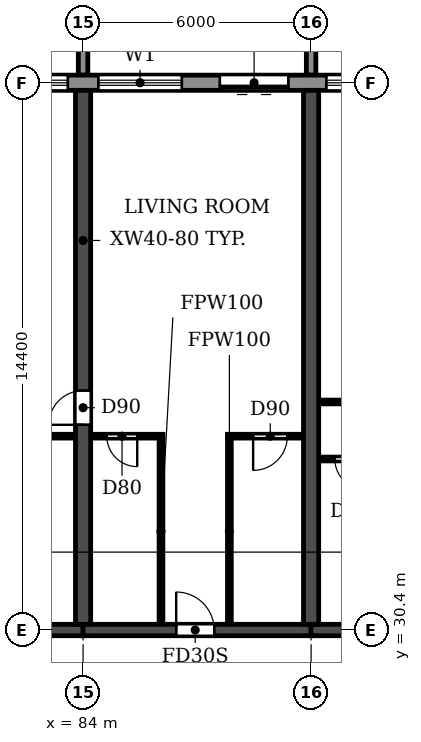
"""IFC4 building model, lengths in metres.
Left out: names, types, materials, properties, quantities, classifications, styles, units other than length and angle.
Written with IfcOpenShell. Run it as: python <this file> out.ifc"""

import sys

from ifc_helpers import new_model, si_unit, direction, frame, frame_2d, origin, place, context, subcontext, project, spatial, polyline, rectangle, outline, extrude, source, transform, mapped, element, fill, save


model = new_model("IFC4")
c1 = context("Model", 3, precision=1e-05, world=origin(), true_north=direction((0.0, 1.0)))
c2 = subcontext(c1, "Body", "Model", "MODEL_VIEW")
j1 = project(units=[si_unit("LENGTHUNIT", "METRE"), si_unit("PLANEANGLEUNIT", "RADIAN")], contexts=[c1])
p1 = place(None, origin())
s1 = spatial("IfcSite", under=j1, at=p1, CompositionType="ELEMENT")
p2 = place(p1, origin())
s2 = spatial("IfcBuilding", under=s1, at=p2, CompositionType="ELEMENT")
p3 = place(p2, frame((0.0, 0.0, 49.8)))
s3 = spatial("IfcBuildingStorey", under=s2, at=p3, CompositionType="ELEMENT", Elevation=49.8)
p4 = place(p3, frame((84.0, 30.55, 0.0), z_axis=(0.0, 0.0, 1.0), x_axis=(0.0, 1.0, 0.0)))
e1 = element("IfcWall", 1, at=p4, inside=s3, PredefinedType="SHEAR", context=c2, shape_type="SweptSolid", body=[
    extrude(rectangle(XDim=14.05, YDim=0.4, at=frame_2d((7.025, 0.0))), origin(), (0.0, 0.0, 1.0), 3.0),
])
p5 = place(p4, frame((5.25, 0.0, 0.0)))
e2 = element("IfcOpeningElement", 2, at=p5, cuts=e1, PredefinedType="OPENING", context=c2, shape_type="SweptSolid", body=[
    extrude(rectangle(XDim=0.9, YDim=2.1, at=frame_2d((0.45, 1.05))), frame((0.0, 0.21, 0.0), z_axis=(0.0, -1.0, 0.0), x_axis=(1.0, 0.0, 0.0)), (0.0, 0.0, 1.0), 0.42),
])
p6 = place(p3, frame((90.0, 30.55, 0.0), z_axis=(0.0, 0.0, 1.0), x_axis=(0.0, 1.0, 0.0)))
e3 = element("IfcWall", 3, at=p6, inside=s3, PredefinedType="SHEAR", context=c2, shape_type="SweptSolid", body=[
    extrude(rectangle(XDim=14.05, YDim=0.4, at=frame_2d((7.025, 0.0))), origin(), (0.0, 0.0, 1.0), 3.0),
])
p7 = place(p3, frame((78.0, 30.4, 0.0), z_axis=(0.0, 0.0, 1.0), x_axis=(1.0, 0.0, 0.0)))
e4 = element("IfcWall", 4, at=p7, inside=s3, PredefinedType="SHEAR", context=c2, shape_type="SweptSolid", body=[
    extrude(rectangle(XDim=6.0, YDim=0.3, at=frame_2d((3.0, 0.0))), origin(), (0.0, 0.0, 1.0), 2.4),
])
p8 = place(p3, frame((84.0, 30.4, 0.0), z_axis=(0.0, 0.0, 1.0), x_axis=(1.0, 0.0, 0.0)))
e5 = element("IfcWall", 5, at=p8, inside=s3, PredefinedType="SHEAR", context=c2, shape_type="SweptSolid", body=[
    extrude(rectangle(XDim=6.0, YDim=0.3, at=frame_2d((3.0, 0.0))), origin(), (0.0, 0.0, 1.0), 2.4),
])
p9 = place(p8, frame((2.45, 0.0, 0.0)))
e6 = element("IfcOpeningElement", 6, at=p9, cuts=e5, PredefinedType="OPENING", context=c2, shape_type="SweptSolid", body=[
    extrude(rectangle(XDim=1.0, YDim=2.1, at=frame_2d((0.5, 1.05))), frame((0.0, 0.16, 0.0), z_axis=(0.0, -1.0, 0.0), x_axis=(1.0, 0.0, 0.0)), (0.0, 0.0, 1.0), 0.32),
])
p10 = place(p3, frame((90.0, 30.4, 0.0), z_axis=(0.0, 0.0, 1.0), x_axis=(1.0, 0.0, 0.0)))
e7 = element("IfcWall", 7, at=p10, inside=s3, PredefinedType="SHEAR", context=c2, shape_type="SweptSolid", body=[
    extrude(rectangle(XDim=6.0, YDim=0.3, at=frame_2d((3.0, 0.0))), origin(), (0.0, 0.0, 1.0), 2.4),
])
p11 = place(p10, frame((2.45, 0.0, 0.0)))
e8 = element("IfcOpeningElement", 8, at=p11, cuts=e7, PredefinedType="OPENING", context=c2, shape_type="SweptSolid", body=[
    extrude(rectangle(XDim=1.0, YDim=2.1, at=frame_2d((0.5, 1.05))), frame((0.0, 0.16, 0.0), z_axis=(0.0, -1.0, 0.0), x_axis=(1.0, 0.0, 0.0)), (0.0, 0.0, 1.0), 0.32),
])
p12 = place(p3, frame((97.317, 44.8, 0.0), z_axis=(0.0, 0.0, 1.0), x_axis=(-1.0, 0.0, 0.0)))
e9 = element("IfcWall", 9, at=p12, inside=s3, PredefinedType="STANDARD", context=c2, shape_type="SweptSolid", body=[
    extrude(rectangle(XDim=92.634, YDim=0.4, at=frame_2d((46.317, 0.0))), origin(), (0.0, 0.0, 1.0), 3.0),
])
p13 = place(p12, frame((88.917, 0.0, 0.0)))
e10 = element("IfcOpeningElement", 10, at=p13, cuts=e9, PredefinedType="OPENING", context=c2, shape_type="SweptSolid", body=[
    extrude(rectangle(XDim=1.8, YDim=2.4, at=frame_2d((0.9, 1.2))), frame((0.0, 0.21, 0.0), z_axis=(0.0, -1.0, 0.0), x_axis=(1.0, 0.0, 0.0)), (0.0, 0.0, 1.0), 0.42),
])
p14 = place(p12, frame((85.717, 0.0, 0.9)))
e11 = element("IfcOpeningElement", 11, at=p14, cuts=e9, PredefinedType="OPENING", context=c2, shape_type="SweptSolid", body=[
    extrude(rectangle(XDim=2.2, YDim=1.5, at=frame_2d((1.1, 0.75))), frame((0.0, 0.21, 0.0), z_axis=(0.0, -1.0, 0.0), x_axis=(1.0, 0.0, 0.0)), (0.0, 0.0, 1.0), 0.42),
])
p15 = place(p12, frame((82.717, 0.0, 0.9)))
e12 = element("IfcOpeningElement", 12, at=p15, cuts=e9, PredefinedType="OPENING", context=c2, shape_type="SweptSolid", body=[
    extrude(rectangle(XDim=2.2, YDim=1.5, at=frame_2d((1.1, 0.75))), frame((0.0, 0.21, 0.0), z_axis=(0.0, -1.0, 0.0), x_axis=(1.0, 0.0, 0.0)), (0.0, 0.0, 1.0), 0.42),
])
p16 = place(p12, frame((79.717, 0.0, 0.9)))
e13 = element("IfcOpeningElement", 13, at=p16, cuts=e9, PredefinedType="OPENING", context=c2, shape_type="SweptSolid", body=[
    extrude(rectangle(XDim=2.2, YDim=1.5, at=frame_2d((1.1, 0.75))), frame((0.0, 0.21, 0.0), z_axis=(0.0, -1.0, 0.0), x_axis=(1.0, 0.0, 0.0)), (0.0, 0.0, 1.0), 0.42),
])
p17 = place(p12, frame((76.717, 0.0, 0.9)))
e14 = element("IfcOpeningElement", 14, at=p17, cuts=e9, PredefinedType="OPENING", context=c2, shape_type="SweptSolid", body=[
    extrude(rectangle(XDim=2.2, YDim=1.5, at=frame_2d((1.1, 0.75))), frame((0.0, 0.21, 0.0), z_axis=(0.0, -1.0, 0.0), x_axis=(1.0, 0.0, 0.0)), (0.0, 0.0, 1.0), 0.42),
])
p18 = place(p12, frame((73.917, 0.0, 0.0)))
e15 = element("IfcOpeningElement", 15, at=p18, cuts=e9, PredefinedType="OPENING", context=c2, shape_type="SweptSolid", body=[
    extrude(rectangle(XDim=1.8, YDim=2.4, at=frame_2d((0.9, 1.2))), frame((0.0, 0.21, 0.0), z_axis=(0.0, -1.0, 0.0), x_axis=(1.0, 0.0, 0.0)), (0.0, 0.0, 1.0), 0.42),
])
p19 = place(p12, frame((70.717, 0.0, 0.9)))
e16 = element("IfcOpeningElement", 16, at=p19, cuts=e9, PredefinedType="OPENING", context=c2, shape_type="SweptSolid", body=[
    extrude(rectangle(XDim=2.2, YDim=1.5, at=frame_2d((1.1, 0.75))), frame((0.0, 0.21, 0.0), z_axis=(0.0, -1.0, 0.0), x_axis=(1.0, 0.0, 0.0)), (0.0, 0.0, 1.0), 0.42),
])
p20 = place(p12, frame((67.717, 0.0, 0.9)))
e17 = element("IfcOpeningElement", 17, at=p20, cuts=e9, PredefinedType="OPENING", context=c2, shape_type="SweptSolid", body=[
    extrude(rectangle(XDim=2.2, YDim=1.5, at=frame_2d((1.1, 0.75))), frame((0.0, 0.21, 0.0), z_axis=(0.0, -1.0, 0.0), x_axis=(1.0, 0.0, 0.0)), (0.0, 0.0, 1.0), 0.42),
])
p21 = place(p12, frame((64.717, 0.0, 0.9)))
e18 = element("IfcOpeningElement", 18, at=p21, cuts=e9, PredefinedType="OPENING", context=c2, shape_type="SweptSolid", body=[
    extrude(rectangle(XDim=2.2, YDim=1.5, at=frame_2d((1.1, 0.75))), frame((0.0, 0.21, 0.0), z_axis=(0.0, -1.0, 0.0), x_axis=(1.0, 0.0, 0.0)), (0.0, 0.0, 1.0), 0.42),
])
p22 = place(p12, frame((61.917, 0.0, 0.0)))
e19 = element("IfcOpeningElement", 19, at=p22, cuts=e9, PredefinedType="OPENING", context=c2, shape_type="SweptSolid", body=[
    extrude(rectangle(XDim=1.8, YDim=2.4, at=frame_2d((0.9, 1.2))), frame((0.0, 0.21, 0.0), z_axis=(0.0, -1.0, 0.0), x_axis=(1.0, 0.0, 0.0)), (0.0, 0.0, 1.0), 0.42),
])
p23 = place(p12, frame((58.717, 0.0, 0.9)))
e20 = element("IfcOpeningElement", 20, at=p23, cuts=e9, PredefinedType="OPENING", context=c2, shape_type="SweptSolid", body=[
    extrude(rectangle(XDim=2.2, YDim=1.5, at=frame_2d((1.1, 0.75))), frame((0.0, 0.21, 0.0), z_axis=(0.0, -1.0, 0.0), x_axis=(1.0, 0.0, 0.0)), (0.0, 0.0, 1.0), 0.42),
])
p24 = place(p12, frame((55.717, 0.0, 0.9)))
e21 = element("IfcOpeningElement", 21, at=p24, cuts=e9, PredefinedType="OPENING", context=c2, shape_type="SweptSolid", body=[
    extrude(rectangle(XDim=2.2, YDim=1.5, at=frame_2d((1.1, 0.75))), frame((0.0, 0.21, 0.0), z_axis=(0.0, -1.0, 0.0), x_axis=(1.0, 0.0, 0.0)), (0.0, 0.0, 1.0), 0.42),
])
p25 = place(p12, frame((52.717, 0.0, 0.9)))
e22 = element("IfcOpeningElement", 22, at=p25, cuts=e9, PredefinedType="OPENING", context=c2, shape_type="SweptSolid", body=[
    extrude(rectangle(XDim=2.2, YDim=1.5, at=frame_2d((1.1, 0.75))), frame((0.0, 0.21, 0.0), z_axis=(0.0, -1.0, 0.0), x_axis=(1.0, 0.0, 0.0)), (0.0, 0.0, 1.0), 0.42),
])
p26 = place(p12, frame((49.917, 0.0, 0.0)))
e23 = element("IfcOpeningElement", 23, at=p26, cuts=e9, PredefinedType="OPENING", context=c2, shape_type="SweptSolid", body=[
    extrude(rectangle(XDim=1.8, YDim=2.4, at=frame_2d((0.9, 1.2))), frame((0.0, 0.21, 0.0), z_axis=(0.0, -1.0, 0.0), x_axis=(1.0, 0.0, 0.0)), (0.0, 0.0, 1.0), 0.42),
])
p27 = place(p12, frame((46.717, 0.0, 0.9)))
e24 = element("IfcOpeningElement", 24, at=p27, cuts=e9, PredefinedType="OPENING", context=c2, shape_type="SweptSolid", body=[
    extrude(rectangle(XDim=2.2, YDim=1.5, at=frame_2d((1.1, 0.75))), frame((0.0, 0.21, 0.0), z_axis=(0.0, -1.0, 0.0), x_axis=(1.0, 0.0, 0.0)), (0.0, 0.0, 1.0), 0.42),
])
p28 = place(p12, frame((43.717, 0.0, 0.9)))
e25 = element("IfcOpeningElement", 25, at=p28, cuts=e9, PredefinedType="OPENING", context=c2, shape_type="SweptSolid", body=[
    extrude(rectangle(XDim=2.2, YDim=1.5, at=frame_2d((1.1, 0.75))), frame((0.0, 0.21, 0.0), z_axis=(0.0, -1.0, 0.0), x_axis=(1.0, 0.0, 0.0)), (0.0, 0.0, 1.0), 0.42),
])
p29 = place(p12, frame((40.717, 0.0, 0.9)))
e26 = element("IfcOpeningElement", 26, at=p29, cuts=e9, PredefinedType="OPENING", context=c2, shape_type="SweptSolid", body=[
    extrude(rectangle(XDim=2.2, YDim=1.5, at=frame_2d((1.1, 0.75))), frame((0.0, 0.21, 0.0), z_axis=(0.0, -1.0, 0.0), x_axis=(1.0, 0.0, 0.0)), (0.0, 0.0, 1.0), 0.42),
])
p30 = place(p12, frame((37.917, 0.0, 0.0)))
e27 = element("IfcOpeningElement", 27, at=p30, cuts=e9, PredefinedType="OPENING", context=c2, shape_type="SweptSolid", body=[
    extrude(rectangle(XDim=1.8, YDim=2.4, at=frame_2d((0.9, 1.2))), frame((0.0, 0.21, 0.0), z_axis=(0.0, -1.0, 0.0), x_axis=(1.0, 0.0, 0.0)), (0.0, 0.0, 1.0), 0.42),
])
p31 = place(p12, frame((34.717, 0.0, 0.9)))
e28 = element("IfcOpeningElement", 28, at=p31, cuts=e9, PredefinedType="OPENING", context=c2, shape_type="SweptSolid", body=[
    extrude(rectangle(XDim=2.2, YDim=1.5, at=frame_2d((1.1, 0.75))), frame((0.0, 0.21, 0.0), z_axis=(0.0, -1.0, 0.0), x_axis=(1.0, 0.0, 0.0)), (0.0, 0.0, 1.0), 0.42),
])
p32 = place(p12, frame((31.717, 0.0, 0.9)))
e29 = element("IfcOpeningElement", 29, at=p32, cuts=e9, PredefinedType="OPENING", context=c2, shape_type="SweptSolid", body=[
    extrude(rectangle(XDim=2.2, YDim=1.5, at=frame_2d((1.1, 0.75))), frame((0.0, 0.21, 0.0), z_axis=(0.0, -1.0, 0.0), x_axis=(1.0, 0.0, 0.0)), (0.0, 0.0, 1.0), 0.42),
])
p33 = place(p12, frame((28.717, 0.0, 0.9)))
e30 = element("IfcOpeningElement", 30, at=p33, cuts=e9, PredefinedType="OPENING", context=c2, shape_type="SweptSolid", body=[
    extrude(rectangle(XDim=2.2, YDim=1.5, at=frame_2d((1.1, 0.75))), frame((0.0, 0.21, 0.0), z_axis=(0.0, -1.0, 0.0), x_axis=(1.0, 0.0, 0.0)), (0.0, 0.0, 1.0), 0.42),
])
p34 = place(p12, frame((25.917, 0.0, 0.0)))
e31 = element("IfcOpeningElement", 31, at=p34, cuts=e9, PredefinedType="OPENING", context=c2, shape_type="SweptSolid", body=[
    extrude(rectangle(XDim=1.8, YDim=2.4, at=frame_2d((0.9, 1.2))), frame((0.0, 0.21, 0.0), z_axis=(0.0, -1.0, 0.0), x_axis=(1.0, 0.0, 0.0)), (0.0, 0.0, 1.0), 0.42),
])
p35 = place(p12, frame((22.917, 0.0, 0.0)))
e32 = element("IfcOpeningElement", 32, at=p35, cuts=e9, PredefinedType="OPENING", context=c2, shape_type="SweptSolid", body=[
    extrude(rectangle(XDim=1.8, YDim=2.4, at=frame_2d((0.9, 1.2))), frame((0.0, 0.21, 0.0), z_axis=(0.0, -1.0, 0.0), x_axis=(1.0, 0.0, 0.0)), (0.0, 0.0, 1.0), 0.42),
])
p36 = place(p12, frame((19.717, 0.0, 0.9)))
e33 = element("IfcOpeningElement", 33, at=p36, cuts=e9, PredefinedType="OPENING", context=c2, shape_type="SweptSolid", body=[
    extrude(rectangle(XDim=2.2, YDim=1.5, at=frame_2d((1.1, 0.75))), frame((0.0, 0.21, 0.0), z_axis=(0.0, -1.0, 0.0), x_axis=(1.0, 0.0, 0.0)), (0.0, 0.0, 1.0), 0.42),
])
p37 = place(p12, frame((16.717, 0.0, 0.9)))
e34 = element("IfcOpeningElement", 34, at=p37, cuts=e9, PredefinedType="OPENING", context=c2, shape_type="SweptSolid", body=[
    extrude(rectangle(XDim=2.2, YDim=1.5, at=frame_2d((1.1, 0.75))), frame((0.0, 0.21, 0.0), z_axis=(0.0, -1.0, 0.0), x_axis=(1.0, 0.0, 0.0)), (0.0, 0.0, 1.0), 0.42),
])
p38 = place(p12, frame((13.717, 0.0, 0.9)))
e35 = element("IfcOpeningElement", 35, at=p38, cuts=e9, PredefinedType="OPENING", context=c2, shape_type="SweptSolid", body=[
    extrude(rectangle(XDim=2.2, YDim=1.5, at=frame_2d((1.1, 0.75))), frame((0.0, 0.21, 0.0), z_axis=(0.0, -1.0, 0.0), x_axis=(1.0, 0.0, 0.0)), (0.0, 0.0, 1.0), 0.42),
])
p39 = place(p12, frame((10.717, 0.0, 0.9)))
e36 = element("IfcOpeningElement", 36, at=p39, cuts=e9, PredefinedType="OPENING", context=c2, shape_type="SweptSolid", body=[
    extrude(rectangle(XDim=2.2, YDim=1.5, at=frame_2d((1.1, 0.75))), frame((0.0, 0.21, 0.0), z_axis=(0.0, -1.0, 0.0), x_axis=(1.0, 0.0, 0.0)), (0.0, 0.0, 1.0), 0.42),
])
p40 = place(p12, frame((7.917, 0.0, 0.0)))
e37 = element("IfcOpeningElement", 37, at=p40, cuts=e9, PredefinedType="OPENING", context=c2, shape_type="SweptSolid", body=[
    extrude(rectangle(XDim=1.8, YDim=2.4, at=frame_2d((0.9, 1.2))), frame((0.0, 0.21, 0.0), z_axis=(0.0, -1.0, 0.0), x_axis=(1.0, 0.0, 0.0)), (0.0, 0.0, 1.0), 0.42),
])
p41 = place(p12, frame((4.717, 0.0, 0.9)))
e38 = element("IfcOpeningElement", 38, at=p41, cuts=e9, PredefinedType="OPENING", context=c2, shape_type="SweptSolid", body=[
    extrude(rectangle(XDim=2.2, YDim=1.5, at=frame_2d((1.1, 0.75))), frame((0.0, 0.21, 0.0), z_axis=(0.0, -1.0, 0.0), x_axis=(1.0, 0.0, 0.0)), (0.0, 0.0, 1.0), 0.42),
])
p42 = place(p12, frame((1.917, 0.0, 0.0)))
e39 = element("IfcOpeningElement", 39, at=p42, cuts=e9, PredefinedType="OPENING", context=c2, shape_type="SweptSolid", body=[
    extrude(rectangle(XDim=1.8, YDim=2.4, at=frame_2d((0.9, 1.2))), frame((0.0, 0.21, 0.0), z_axis=(0.0, -1.0, 0.0), x_axis=(1.0, 0.0, 0.0)), (0.0, 0.0, 1.0), 0.42),
])
m1 = source(origin(), c2, "Body", "SweptSolid", [
    extrude(outline(polyline([(0.0, 0.0), (0.25, 0.0), (0.25, 3.1), (0.0, 3.1), (0.0, 0.0)])), origin(), (0.0, 0.0, 1.0), 3.1),
])
for number, where in (
    (40, (83.875, 45.0, 0.0)),
    (41, (89.875, 45.0, 0.0)),
):
    element("IfcWall", number, at=place(p3, frame(where)), inside=s3, PredefinedType="STANDARD", context=c2, shape_type="MappedRepresentation", body=[
        mapped(m1, transform((0.0, 0.0, 0.0))),
    ])
p43 = place(p3, frame((90.21, 34.9, 0.0), z_axis=(0.0, 0.0, 1.0), x_axis=(1.0, 0.0, 0.0)))
e42 = element("IfcWall", 42, at=p43, inside=s3, PredefinedType="PARTITIONING", context=c2, shape_type="SweptSolid", body=[
    extrude(rectangle(XDim=1.89, YDim=0.1, at=frame_2d((0.945, 0.0))), origin(), (0.0, 0.0, 1.0), 3.0),
])
p44 = place(p43, frame((0.415, 0.0, 0.0)))
e43 = element("IfcOpeningElement", 43, at=p44, cuts=e42, PredefinedType="OPENING", context=c2, shape_type="SweptSolid", body=[
    extrude(rectangle(XDim=0.8, YDim=2.1, at=frame_2d((0.4, 1.05))), frame((0.0, 0.06, 0.0), z_axis=(0.0, -1.0, 0.0), x_axis=(1.0, 0.0, 0.0)), (0.0, 0.0, 1.0), 0.12),
])
p45 = place(p3, frame((81.1, 35.5, 0.0), z_axis=(0.0, 0.0, 1.0), x_axis=(1.0, 0.0, 0.0)))
e44 = element("IfcWall", 44, at=p45, inside=s3, PredefinedType="PARTITIONING", context=c2, shape_type="SweptSolid", body=[
    extrude(rectangle(XDim=2.69, YDim=0.1, at=frame_2d((1.345, 0.0))), origin(), (0.0, 0.0, 1.0), 3.0),
])
p46 = place(p45, frame((1.0, 0.0, 0.0)))
e45 = element("IfcOpeningElement", 45, at=p46, cuts=e44, PredefinedType="OPENING", context=c2, shape_type="SweptSolid", body=[
    extrude(rectangle(XDim=0.8, YDim=2.1, at=frame_2d((0.4, 1.05))), frame((0.0, 0.06, 0.0), z_axis=(0.0, -1.0, 0.0), x_axis=(1.0, 0.0, 0.0)), (0.0, 0.0, 1.0), 0.12),
])
p47 = place(p3, frame((84.21, 35.5, 0.0), z_axis=(0.0, 0.0, 1.0), x_axis=(1.0, 0.0, 0.0)))
e46 = element("IfcWall", 46, at=p47, inside=s3, PredefinedType="PARTITIONING", context=c2, shape_type="SweptSolid", body=[
    extrude(rectangle(XDim=1.89, YDim=0.1, at=frame_2d((0.945, 0.0))), origin(), (0.0, 0.0, 1.0), 3.0),
])
p48 = place(p47, frame((0.415, 0.0, 0.0)))
e47 = element("IfcOpeningElement", 47, at=p48, cuts=e46, PredefinedType="OPENING", context=c2, shape_type="SweptSolid", body=[
    extrude(rectangle(XDim=0.8, YDim=2.1, at=frame_2d((0.4, 1.05))), frame((0.0, 0.06, 0.0), z_axis=(0.0, -1.0, 0.0), x_axis=(1.0, 0.0, 0.0)), (0.0, 0.0, 1.0), 0.12),
])
p49 = place(p3, frame((87.8, 35.5, 0.0), z_axis=(0.0, 0.0, 1.0), x_axis=(1.0, 0.0, 0.0)))
e48 = element("IfcWall", 48, at=p49, inside=s3, PredefinedType="PARTITIONING", context=c2, shape_type="SweptSolid", body=[
    extrude(rectangle(XDim=1.99, YDim=0.1, at=frame_2d((0.995, 0.0))), origin(), (0.0, 0.0, 1.0), 3.0),
])
p50 = place(p49, frame((0.675, 0.0, 0.0)))
e49 = element("IfcOpeningElement", 49, at=p50, cuts=e48, PredefinedType="OPENING", context=c2, shape_type="SweptSolid", body=[
    extrude(rectangle(XDim=0.9, YDim=2.1, at=frame_2d((0.45, 1.05))), frame((0.0, 0.06, 0.0), z_axis=(0.0, -1.0, 0.0), x_axis=(1.0, 0.0, 0.0)), (0.0, 0.0, 1.0), 0.12),
])
p51 = place(p3, frame((90.21, 36.4, 0.0), z_axis=(0.0, 0.0, 1.0), x_axis=(1.0, 0.0, 0.0)))
e50 = element("IfcWall", 50, at=p51, inside=s3, PredefinedType="PARTITIONING", context=c2, shape_type="SweptSolid", body=[
    extrude(rectangle(XDim=2.84, YDim=0.1, at=frame_2d((1.42, 0.0))), origin(), (0.0, 0.0, 1.0), 3.0),
])
p52 = place(p51, frame((1.39, 0.0, 0.0)))
e51 = element("IfcOpeningElement", 51, at=p52, cuts=e50, PredefinedType="OPENING", context=c2, shape_type="SweptSolid", body=[
    extrude(rectangle(XDim=0.9, YDim=2.1, at=frame_2d((0.45, 1.05))), frame((0.0, 0.06, 0.0), z_axis=(0.0, -1.0, 0.0), x_axis=(1.0, 0.0, 0.0)), (0.0, 0.0, 1.0), 0.12),
])
for number, where, z_axis, x_axis in (
    (52, (86.05, 30.56, 0.0), (0.0, 0.0, 1.0), (0.0, 1.0, 0.0)),
    (53, (87.85, 30.56, 0.0), (0.0, 0.0, 1.0), (0.0, 1.0, 0.0)),
):
    element("IfcWall", number, at=place(p3, frame(where, z_axis=z_axis, x_axis=x_axis)), inside=s3, PredefinedType="PARTITIONING", context=c2, shape_type="SweptSolid", body=[
        extrude(rectangle(XDim=4.89, YDim=0.1, at=frame_2d((2.445, 0.0))), origin(), (0.0, 0.0, 1.0), 3.0),
    ])
p53 = place(p38, origin())
e54 = element("IfcWindow", 54, at=p53, inside=s3, PartitioningType="DOUBLE_PANEL_HORIZONTAL", PredefinedType="WINDOW", context=c2, shape_type="SweptSolid", body=[
    extrude(rectangle(XDim=2.2, YDim=1.5, at=frame_2d((1.1, 0.75))), frame((0.0, 0.03, 0.0), z_axis=(0.0, -1.0, 0.0), x_axis=(1.0, 0.0, 0.0)), (0.0, 0.0, 1.0), 0.06),
])
fill(e35, e54)
p54 = place(p39, origin())
e55 = element("IfcWindow", 55, at=p54, inside=s3, PartitioningType="DOUBLE_PANEL_HORIZONTAL", PredefinedType="WINDOW", context=c2, shape_type="SweptSolid", body=[
    extrude(rectangle(XDim=2.2, YDim=1.5, at=frame_2d((1.1, 0.75))), frame((0.0, 0.03, 0.0), z_axis=(0.0, -1.0, 0.0), x_axis=(1.0, 0.0, 0.0)), (0.0, 0.0, 1.0), 0.06),
])
fill(e36, e55)
p55 = place(p40, origin())
e56 = element("IfcDoor", 56, at=p55, inside=s3, OperationType="DOUBLE_DOOR_SLIDING", PredefinedType="DOOR", context=c2, shape_type="SweptSolid", body=[
    extrude(rectangle(XDim=1.8, YDim=2.4, at=frame_2d((0.9, 1.2))), frame((0.0, 0.025, 0.0), z_axis=(0.0, -1.0, 0.0), x_axis=(1.0, 0.0, 0.0)), (0.0, 0.0, 1.0), 0.05),
])
fill(e37, e56)
p56 = place(p41, origin())
e57 = element("IfcWindow", 57, at=p56, inside=s3, PartitioningType="DOUBLE_PANEL_HORIZONTAL", PredefinedType="WINDOW", context=c2, shape_type="SweptSolid", body=[
    extrude(rectangle(XDim=2.2, YDim=1.5, at=frame_2d((1.1, 0.75))), frame((0.0, 0.03, 0.0), z_axis=(0.0, -1.0, 0.0), x_axis=(1.0, 0.0, 0.0)), (0.0, 0.0, 1.0), 0.06),
])
fill(e38, e57)
p57 = place(p5, origin())
e58 = element("IfcDoor", 58, at=p57, inside=s3, OperationType="SINGLE_SWING_LEFT", PredefinedType="DOOR", context=c2, shape_type="SweptSolid", body=[
    extrude(rectangle(XDim=0.9, YDim=2.1, at=frame_2d((0.45, 1.05))), frame((0.0, 0.025, 0.0), z_axis=(0.0, -1.0, 0.0), x_axis=(1.0, 0.0, 0.0)), (0.0, 0.0, 1.0), 0.05),
])
fill(e2, e58)
p58 = place(p48, frame((0.8, 0.0, 0.0), z_axis=(0.0, 0.0, 1.0), x_axis=(-1.0, 0.0, 0.0)))
e59 = element("IfcDoor", 59, at=p58, inside=s3, OperationType="SINGLE_SWING_LEFT", PredefinedType="DOOR", context=c2, shape_type="SweptSolid", body=[
    extrude(rectangle(XDim=0.8, YDim=2.1, at=frame_2d((0.4, 1.05))), frame((0.0, 0.025, 0.0), z_axis=(0.0, -1.0, 0.0), x_axis=(1.0, 0.0, 0.0)), (0.0, 0.0, 1.0), 0.05),
])
fill(e47, e59)
p59 = place(p9, origin())
e60 = element("IfcDoor", 60, at=p59, inside=s3, OperationType="SINGLE_SWING_LEFT", PredefinedType="DOOR", context=c2, shape_type="SweptSolid", body=[
    extrude(rectangle(XDim=1.0, YDim=2.1, at=frame_2d((0.5, 1.05))), frame((0.0, 0.025, 0.0), z_axis=(0.0, -1.0, 0.0), x_axis=(1.0, 0.0, 0.0)), (0.0, 0.0, 1.0), 0.05),
])
fill(e6, e60)
p60 = place(p50, frame((0.9, 0.0, 0.0), z_axis=(0.0, 0.0, 1.0), x_axis=(-1.0, 0.0, 0.0)))
e61 = element("IfcDoor", 61, at=p60, inside=s3, OperationType="SINGLE_SWING_RIGHT", PredefinedType="DOOR", context=c2, shape_type="SweptSolid", body=[
    extrude(rectangle(XDim=0.9, YDim=2.1, at=frame_2d((0.45, 1.05))), frame((0.0, 0.025, 0.0), z_axis=(0.0, -1.0, 0.0), x_axis=(1.0, 0.0, 0.0)), (0.0, 0.0, 1.0), 0.05),
])
fill(e49, e61)
p61 = place(p44, frame((0.8, 0.0, 0.0), z_axis=(0.0, 0.0, 1.0), x_axis=(-1.0, 0.0, 0.0)))
e62 = element("IfcDoor", 62, at=p61, inside=s3, OperationType="SINGLE_SWING_LEFT", PredefinedType="DOOR", context=c2, shape_type="SweptSolid", body=[
    extrude(rectangle(XDim=0.8, YDim=2.1, at=frame_2d((0.4, 1.05))), frame((0.0, 0.025, 0.0), z_axis=(0.0, -1.0, 0.0), x_axis=(1.0, 0.0, 0.0)), (0.0, 0.0, 1.0), 0.05),
])
fill(e43, e62)
save(model, sys.argv[1])
